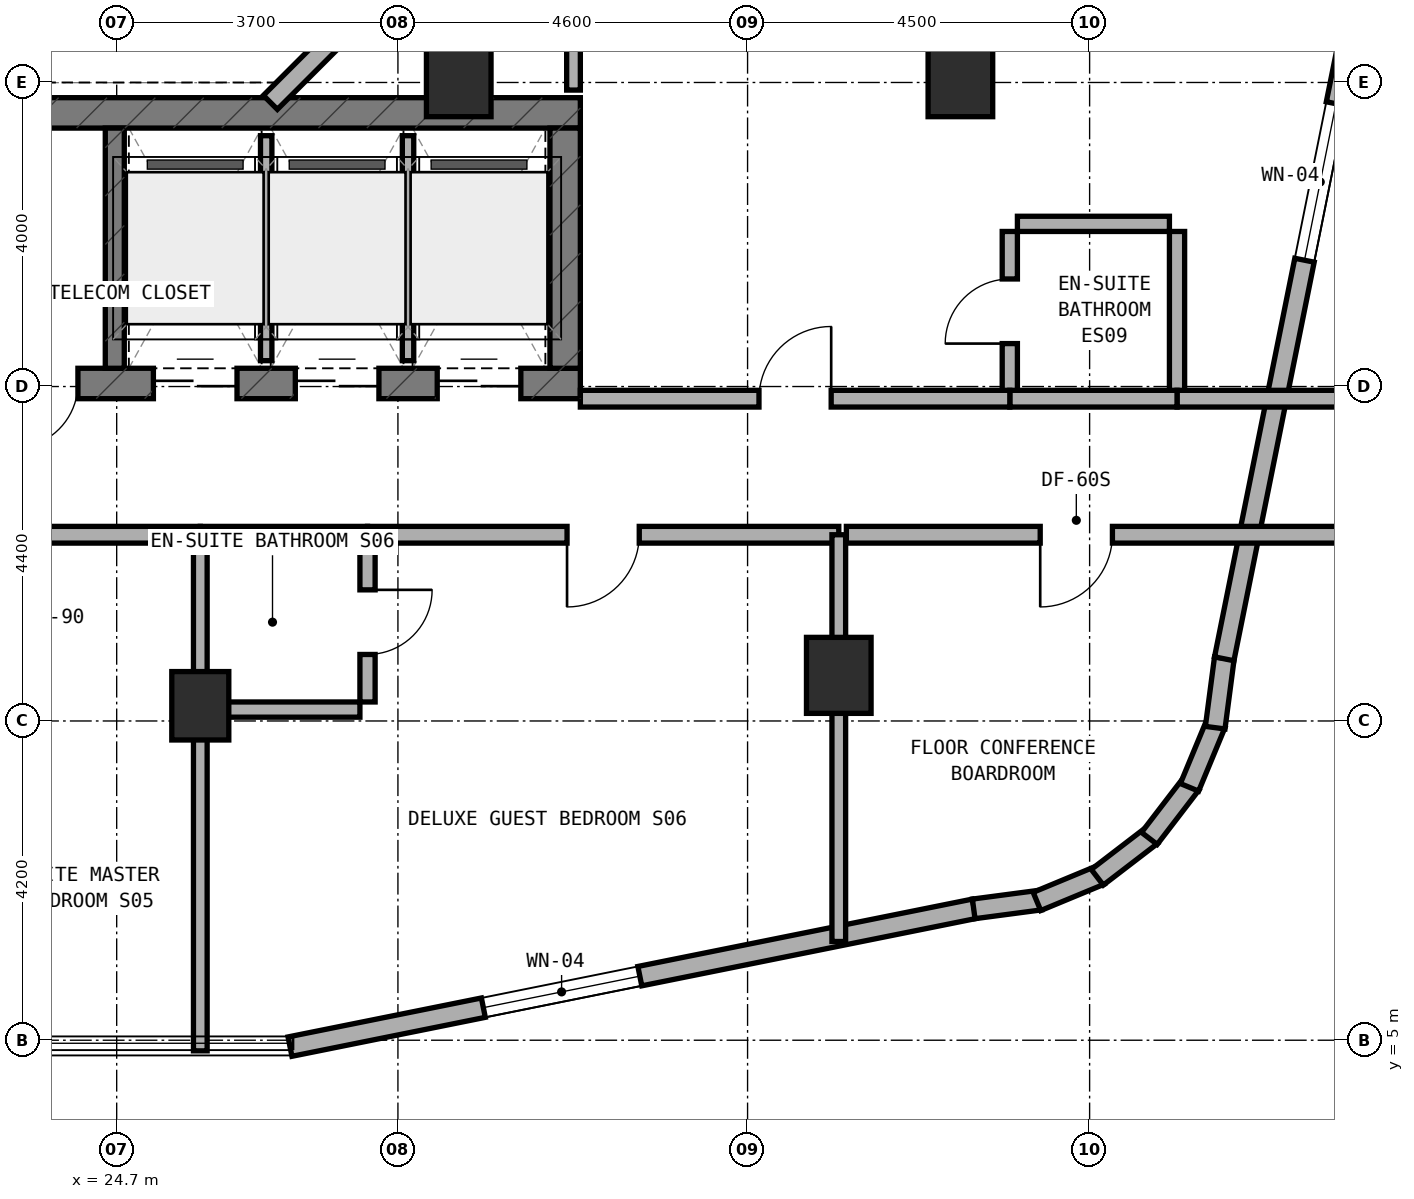
"""IFC4 building model, lengths in metres.
Left out: names, types, materials, properties, quantities, classifications, styles, units other than length and angle.
Written with IfcOpenShell. Run it as: python <this file> out.ifc"""

import sys

from ifc_helpers import new_model, si_unit, direction, frame, frame_2d, origin, origin_2d, place, context, subcontext, project, spatial, rectangle, extrude, element, fill, save


model = new_model("IFC4")
c1 = context("Model", 3, precision=1e-05, world=origin(), true_north=direction((0.0, 1.0)))
c2 = subcontext(c1, "Body", "Model", "MODEL_VIEW")
j1 = project(units=[si_unit("LENGTHUNIT", "METRE"), si_unit("PLANEANGLEUNIT", "RADIAN")], contexts=[c1])
p1 = place(None, origin())
s1 = spatial("IfcSite", under=j1, at=p1, CompositionType="ELEMENT")
p2 = place(p1, origin())
s2 = spatial("IfcBuilding", under=s1, at=p2, CompositionType="ELEMENT")
p3 = place(p2, frame((0.0, 0.0, 138.0)))
s3 = spatial("IfcBuildingStorey", under=s2, at=p3, CompositionType="ELEMENT", Elevation=138.0)
p4 = place(p3, frame((6.4, 13.64, 0.0), z_axis=(0.0, 0.0, 1.0), x_axis=(1.0, 0.0, 0.0)))
e1 = element("IfcWall", 1, at=p4, inside=s3, PredefinedType="SHEAR", context=c2, shape_type="SweptSolid", body=[
    extrude(rectangle(XDim=24.4, YDim=0.4, at=frame_2d((12.2, 0.0))), origin(), (0.0, 0.0, 1.0), 3.5),
])
p5 = place(p4, frame((9.15, 0.0, 0.0)))
e2 = element("IfcOpeningElement", 2, at=p5, cuts=e1, PredefinedType="OPENING", context=c2, shape_type="SweptSolid", body=[
    extrude(rectangle(XDim=1.2, YDim=2.15, at=frame_2d((0.6, 1.075))), frame((0.0, 0.21, 0.0), z_axis=(0.0, -1.0, 0.0), x_axis=(1.0, 0.0, 0.0)), (0.0, 0.0, 1.0), 0.42),
])
p6 = place(p4, frame((16.94, 0.0, 0.0)))
e3 = element("IfcOpeningElement", 3, at=p6, cuts=e1, PredefinedType="OPENING", context=c2, shape_type="SweptSolid", body=[
    extrude(rectangle(XDim=0.85, YDim=2.1, at=frame_2d((0.425, 1.05))), frame((0.0, 0.21, 0.0), z_axis=(0.0, -1.0, 0.0), x_axis=(1.0, 0.0, 0.0)), (0.0, 0.0, 1.0), 0.42),
])
p7 = place(p4, frame((18.783, 0.0, 0.0)))
e4 = element("IfcOpeningElement", 4, at=p7, cuts=e1, PredefinedType="OPENING", context=c2, shape_type="SweptSolid", body=[
    extrude(rectangle(XDim=1.1, YDim=2.15, at=frame_2d((0.55, 1.075))), frame((0.0, 0.21, 0.0), z_axis=(0.0, -1.0, 0.0), x_axis=(1.0, 0.0, 0.0)), (0.0, 0.0, 1.0), 0.42),
])
p8 = place(p4, frame((20.65, 0.0, 0.0)))
e5 = element("IfcOpeningElement", 5, at=p8, cuts=e1, PredefinedType="OPENING", context=c2, shape_type="SweptSolid", body=[
    extrude(rectangle(XDim=1.1, YDim=2.15, at=frame_2d((0.55, 1.075))), frame((0.0, 0.21, 0.0), z_axis=(0.0, -1.0, 0.0), x_axis=(1.0, 0.0, 0.0)), (0.0, 0.0, 1.0), 0.42),
])
p9 = place(p4, frame((22.517, 0.0, 0.0)))
e6 = element("IfcOpeningElement", 6, at=p9, cuts=e1, PredefinedType="OPENING", context=c2, shape_type="SweptSolid", body=[
    extrude(rectangle(XDim=1.1, YDim=2.15, at=frame_2d((0.55, 1.075))), frame((0.0, 0.21, 0.0), z_axis=(0.0, -1.0, 0.0), x_axis=(1.0, 0.0, 0.0)), (0.0, 0.0, 1.0), 0.42),
])
p10 = place(p3, frame((6.4, 17.2, 0.0), z_axis=(0.0, 0.0, 1.0), x_axis=(1.0, 0.0, 0.0)))
e7 = element("IfcWall", 7, at=p10, inside=s3, PredefinedType="SHEAR", context=c2, shape_type="SweptSolid", body=[
    extrude(rectangle(XDim=24.4, YDim=0.4, at=frame_2d((12.2, 0.0))), origin(), (0.0, 0.0, 1.0), 3.5),
])
p11 = place(p3, frame((30.6, 13.84, 0.0), z_axis=(0.0, 0.0, 1.0), x_axis=(0.0, 1.0, 0.0)))
e8 = element("IfcWall", 8, at=p11, inside=s3, PredefinedType="SHEAR", context=c2, shape_type="SweptSolid", body=[
    extrude(rectangle(XDim=3.16, YDim=0.4, at=frame_2d((1.58, 0.0))), origin(), (0.0, 0.0, 1.0), 3.5),
])
p12 = place(p3, frame((24.675, 13.84, 0.0), z_axis=(0.0, 0.0, 1.0), x_axis=(0.0, 1.0, 0.0)))
e9 = element("IfcWall", 9, at=p12, inside=s3, PredefinedType="STANDARD", context=c2, shape_type="SweptSolid", body=[
    extrude(rectangle(XDim=3.16, YDim=0.25, at=frame_2d((1.58, 0.0))), origin(), (0.0, 0.0, 1.0), 3.22),
])
p13 = place(p3, frame((25.8, 9.4, 0.0), z_axis=(0.0, 0.0, 1.0), x_axis=(1.0, 0.0, 0.0)))
e10 = element("IfcColumn", 10, at=p13, inside=s3, PredefinedType="COLUMN", context=c2, shape_type="SweptSolid", body=[
    extrude(rectangle(XDim=0.75, YDim=0.9, at=origin_2d()), origin(), (0.0, 0.0, 1.0), 3.5),
])
for number, where, z_axis, x_axis in (
    (11, (34.2, 9.8, 0.0), (0.0, 0.0, 1.0), (1.0, 0.0, 0.0)),
    (12, (35.8, 17.65, 0.0), (0.0, 0.0, 1.0), (1.0, 0.0, 0.0)),
    (13, (29.2, 17.65, 0.0), (0.0, 0.0, 1.0), (1.0, 0.0, 0.0)),
):
    element("IfcColumn", number, at=place(p3, frame(where, z_axis=z_axis, x_axis=x_axis)), inside=s3, PredefinedType="COLUMN", context=c2, shape_type="SweptSolid", body=[
        extrude(rectangle(XDim=0.85, YDim=1.0, at=origin_2d()), origin(), (0.0, 0.0, 1.0), 3.5),
    ])
p14 = place(p3, frame((26.98, 4.916, 0.0), z_axis=(0.0, 0.0, 1.0), x_axis=(0.980315963543, 0.197435082048, 0.0)))
e14 = element("IfcWall", 14, at=p14, inside=s3, PredefinedType="STANDARD", context=c2, shape_type="SweptSolid", body=[
    extrude(rectangle(XDim=9.183, YDim=0.26, at=frame_2d((4.591, 0.0))), origin(), (0.0, 0.0, 1.0), 3.22),
])
p15 = place(p14, frame((2.595, 0.0, 0.85)))
e15 = element("IfcOpeningElement", 15, at=p15, cuts=e14, PredefinedType="OPENING", context=c2, shape_type="SweptSolid", body=[
    extrude(rectangle(XDim=2.1, YDim=1.5, at=frame_2d((1.05, 0.75))), frame((0.0, 0.14, 0.0), z_axis=(0.0, -1.0, 0.0), x_axis=(1.0, 0.0, 0.0)), (0.0, 0.0, 1.0), 0.28),
])
p16 = place(p3, frame((35.975, 6.728, 0.0), z_axis=(0.0, 0.0, 1.0), x_axis=(0.991388484223, 0.130953706898, 0.0)))
e16 = element("IfcWall", 16, at=p16, inside=s3, PredefinedType="STANDARD", context=c2, shape_type="SweptSolid", body=[
    extrude(rectangle(XDim=0.885, YDim=0.26, at=frame_2d((0.443, 0.0))), origin(), (0.0, 0.0, 1.0), 3.22),
])
p17 = place(p3, frame((36.807, 6.826, 0.0), z_axis=(0.0, 0.0, 1.0), x_axis=(0.923627776508, 0.383290660547, 0.0)))
e17 = element("IfcWall", 17, at=p17, inside=s3, PredefinedType="STANDARD", context=c2, shape_type="SweptSolid", body=[
    extrude(rectangle(XDim=0.903, YDim=0.26, at=frame_2d((0.452, 0.0))), origin(), (0.0, 0.0, 1.0), 3.22),
])
p18 = place(p3, frame((37.601, 7.144, 0.0), z_axis=(0.0, 0.0, 1.0), x_axis=(0.793458244748, 0.608624690463, 0.0)))
e18 = element("IfcWall", 18, at=p18, inside=s3, PredefinedType="STANDARD", context=c2, shape_type="SweptSolid", body=[
    extrude(rectangle(XDim=0.902, YDim=0.26, at=frame_2d((0.451, 0.0))), origin(), (0.0, 0.0, 1.0), 3.22),
])
p19 = place(p3, frame((38.286, 7.655, 0.0), z_axis=(0.0, 0.0, 1.0), x_axis=(0.608494022858, 0.793558456666, 0.0)))
e19 = element("IfcWall", 19, at=p19, inside=s3, PredefinedType="STANDARD", context=c2, shape_type="SweptSolid", body=[
    extrude(rectangle(XDim=0.902, YDim=0.26, at=frame_2d((0.451, 0.0))), origin(), (0.0, 0.0, 1.0), 3.22),
])
p20 = place(p3, frame((38.814, 8.327, 0.0), z_axis=(0.0, 0.0, 1.0), x_axis=(0.383155708213, 0.923683767999, 0.0)))
e20 = element("IfcWall", 20, at=p20, inside=s3, PredefinedType="STANDARD", context=c2, shape_type="SweptSolid", body=[
    extrude(rectangle(XDim=0.903, YDim=0.26, at=frame_2d((0.451, 0.0))), origin(), (0.0, 0.0, 1.0), 3.22),
])
p21 = place(p3, frame((39.152, 9.112, 0.0), z_axis=(0.0, 0.0, 1.0), x_axis=(0.130200706103, 0.991487658083, 0.0)))
e21 = element("IfcWall", 21, at=p21, inside=s3, PredefinedType="STANDARD", context=c2, shape_type="SweptSolid", body=[
    extrude(rectangle(XDim=0.921, YDim=0.26, at=frame_2d((0.46, 0.0))), origin(), (0.0, 0.0, 1.0), 3.22),
])
p22 = place(p3, frame((39.271, 10.018, 0.0), z_axis=(0.0, 0.0, 1.0), x_axis=(0.197435082048, 0.980315963543, 0.0)))
e22 = element("IfcWall", 22, at=p22, inside=s3, PredefinedType="STANDARD", context=c2, shape_type="SweptSolid", body=[
    extrude(rectangle(XDim=9.183, YDim=0.26, at=frame_2d((4.591, 0.0))), origin(), (0.0, 0.0, 1.0), 3.22),
])
p23 = place(p22, frame((5.349, 0.0, 0.85)))
e23 = element("IfcOpeningElement", 23, at=p23, cuts=e22, PredefinedType="OPENING", context=c2, shape_type="SweptSolid", body=[
    extrude(rectangle(XDim=2.1, YDim=1.5, at=frame_2d((1.05, 0.75))), frame((0.0, 0.14, 0.0), z_axis=(0.0, -1.0, 0.0), x_axis=(1.0, 0.0, 0.0)), (0.0, 0.0, 1.0), 0.28),
])
p24 = place(p3, frame((26.722, 17.338, 0.0), z_axis=(0.0, 0.0, 1.0), x_axis=(0.707059717605, 0.707153841636, 0.0)))
e24 = element("IfcWall", 24, at=p24, inside=s3, PredefinedType="STANDARD", context=c2, shape_type="SweptSolid", body=[
    extrude(rectangle(XDim=2.594, YDim=0.26, at=frame_2d((1.297, 0.0))), origin(), (0.0, 0.0, 1.0), 3.22),
])
p25 = place(p3, frame((26.667, 13.94, 0.0), z_axis=(0.0, 0.0, 1.0), x_axis=(0.0, 1.0, 0.0)))
e25 = element("IfcWall", 25, at=p25, inside=s3, PredefinedType="PARTITIONING", context=c2, shape_type="SweptSolid", body=[
    extrude(rectangle(XDim=2.96, YDim=0.15, at=frame_2d((1.48, 0.0))), origin(), (0.0, 0.0, 1.0), 3.22),
])
p26 = place(p3, frame((28.533, 13.94, 0.0), z_axis=(0.0, 0.0, 1.0), x_axis=(0.0, 1.0, 0.0)))
e26 = element("IfcWall", 26, at=p26, inside=s3, PredefinedType="PARTITIONING", context=c2, shape_type="SweptSolid", body=[
    extrude(rectangle(XDim=2.96, YDim=0.15, at=frame_2d((1.48, 0.0))), origin(), (0.0, 0.0, 1.0), 2.695),
])
p27 = place(p3, frame((10.0, 11.65, 0.0), z_axis=(0.0, 0.0, 1.0), x_axis=(1.0, 0.0, 0.0)))
e27 = element("IfcWall", 27, at=p27, inside=s3, PredefinedType="SOLIDWALL", context=c2, shape_type="SweptSolid", body=[
    extrude(rectangle(XDim=15.8, YDim=0.22, at=frame_2d((7.9, 0.0))), origin(), (0.0, 0.0, 1.0), 2.695),
])
p28 = place(p27, frame((7.425, 0.0, 0.0)))
e28 = element("IfcOpeningElement", 28, at=p28, cuts=e27, PredefinedType="OPENING", context=c2, shape_type="SweptSolid", body=[
    extrude(rectangle(XDim=0.95, YDim=2.1, at=frame_2d((0.475, 1.05))), frame((0.0, 0.12, 0.0), z_axis=(0.0, -1.0, 0.0), x_axis=(1.0, 0.0, 0.0)), (0.0, 0.0, 1.0), 0.24),
])
p29 = place(p3, frame((25.8, 4.86, 0.0), z_axis=(0.0, 0.0, 1.0), x_axis=(0.0, 1.0, 0.0)))
e29 = element("IfcWall", 29, at=p29, inside=s3, PredefinedType="SOLIDWALL", context=c2, shape_type="SweptSolid", body=[
    extrude(rectangle(XDim=6.79, YDim=0.18, at=frame_2d((3.395, 0.0))), origin(), (0.0, 0.0, 1.0), 2.695),
])
p30 = place(p3, frame((28.0, 9.45, 0.0), z_axis=(0.0, 0.0, 1.0), x_axis=(0.0, 1.0, 0.0)))
e30 = element("IfcWall", 30, at=p30, inside=s3, PredefinedType="PLUMBINGWALL", context=c2, shape_type="SweptSolid", body=[
    extrude(rectangle(XDim=2.1, YDim=0.2, at=frame_2d((1.05, 0.0))), origin(), (0.0, 0.0, 1.0), 2.835),
])
p31 = place(p30, frame((0.625, 0.0, 0.0)))
e31 = element("IfcOpeningElement", 31, at=p31, cuts=e30, PredefinedType="OPENING", context=c2, shape_type="SweptSolid", body=[
    extrude(rectangle(XDim=0.85, YDim=2.1, at=frame_2d((0.425, 1.05))), frame((0.0, 0.11, 0.0), z_axis=(0.0, -1.0, 0.0), x_axis=(1.0, 0.0, 0.0)), (0.0, 0.0, 1.0), 0.22),
])
p32 = place(p3, frame((25.9, 9.35, 0.0), z_axis=(0.0, 0.0, 1.0), x_axis=(1.0, 0.0, 0.0)))
e32 = element("IfcWall", 32, at=p32, inside=s3, PredefinedType="PLUMBINGWALL", context=c2, shape_type="SweptSolid", body=[
    extrude(rectangle(XDim=2.0, YDim=0.2, at=frame_2d((1.0, 0.0))), origin(), (0.0, 0.0, 1.0), 2.835),
])
p33 = place(p3, frame((25.8, 11.65, 0.0), z_axis=(0.0, 0.0, 1.0), x_axis=(1.0, 0.0, 0.0)))
e33 = element("IfcWall", 33, at=p33, inside=s3, PredefinedType="SOLIDWALL", context=c2, shape_type="SweptSolid", body=[
    extrude(rectangle(XDim=2.2, YDim=0.22, at=frame_2d((1.1, 0.0))), origin(), (0.0, 0.0, 1.0), 2.695),
])
p34 = place(p3, frame((28.0, 11.65, 0.0), z_axis=(0.0, 0.0, 1.0), x_axis=(1.0, 0.0, 0.0)))
e34 = element("IfcWall", 34, at=p34, inside=s3, PredefinedType="SOLIDWALL", context=c2, shape_type="SweptSolid", body=[
    extrude(rectangle(XDim=6.2, YDim=0.22, at=frame_2d((3.1, 0.0))), origin(), (0.0, 0.0, 1.0), 2.695),
])
p35 = place(p34, frame((2.625, 0.0, 0.0)))
e35 = element("IfcOpeningElement", 35, at=p35, cuts=e34, PredefinedType="OPENING", context=c2, shape_type="SweptSolid", body=[
    extrude(rectangle(XDim=0.95, YDim=2.1, at=frame_2d((0.475, 1.05))), frame((0.0, 0.12, 0.0), z_axis=(0.0, -1.0, 0.0), x_axis=(1.0, 0.0, 0.0)), (0.0, 0.0, 1.0), 0.24),
])
p36 = place(p3, frame((34.2, 6.299, 0.0), z_axis=(0.0, 0.0, 1.0), x_axis=(0.0, 1.0, 0.0)))
e36 = element("IfcWall", 36, at=p36, inside=s3, PredefinedType="SOLIDWALL", context=c2, shape_type="SweptSolid", body=[
    extrude(rectangle(XDim=5.351, YDim=0.18, at=frame_2d((2.675, 0.0))), origin(), (0.0, 0.0, 1.0), 2.695),
])
p37 = place(p3, frame((34.3, 11.65, 0.0), z_axis=(0.0, 0.0, 1.0), x_axis=(1.0, 0.0, 0.0)))
e37 = element("IfcWall", 37, at=p37, inside=s3, PredefinedType="SOLIDWALL", context=c2, shape_type="SweptSolid", body=[
    extrude(rectangle(XDim=6.64, YDim=0.22, at=frame_2d((3.32, 0.0))), origin(), (0.0, 0.0, 1.0), 2.835),
])
p38 = place(p37, frame((2.55, 0.0, 0.0)))
e38 = element("IfcOpeningElement", 38, at=p38, cuts=e37, PredefinedType="OPENING", context=c2, shape_type="SweptSolid", body=[
    extrude(rectangle(XDim=0.95, YDim=2.1, at=frame_2d((0.475, 1.05))), frame((0.0, 0.12, 0.0), z_axis=(0.0, -1.0, 0.0), x_axis=(1.0, 0.0, 0.0)), (0.0, 0.0, 1.0), 0.24),
])
p39 = place(p3, frame((30.71, 17.5, 0.0), z_axis=(0.0, 0.0, 1.0), x_axis=(0.0, 1.0, 0.0)))
e39 = element("IfcWall", 39, at=p39, inside=s3, PredefinedType="SOLIDWALL", context=c2, shape_type="SweptSolid", body=[
    extrude(rectangle(XDim=15.0, YDim=0.18, at=frame_2d((7.5, 0.0))), origin(), (0.0, 0.0, 1.0), 2.695),
])
p40 = place(p3, frame((36.45, 13.54, 0.0), z_axis=(0.0, 0.0, 1.0), x_axis=(0.0, 1.0, 0.0)))
e40 = element("IfcWall", 40, at=p40, inside=s3, PredefinedType="PLUMBINGWALL", context=c2, shape_type="SweptSolid", body=[
    extrude(rectangle(XDim=2.1, YDim=0.2, at=frame_2d((1.05, 0.0))), origin(), (0.0, 0.0, 1.0), 3.22),
])
p41 = place(p40, frame((0.625, 0.0, 0.0)))
e41 = element("IfcOpeningElement", 41, at=p41, cuts=e40, PredefinedType="OPENING", context=c2, shape_type="SweptSolid", body=[
    extrude(rectangle(XDim=0.85, YDim=2.1, at=frame_2d((0.425, 1.05))), frame((0.0, 0.11, 0.0), z_axis=(0.0, -1.0, 0.0), x_axis=(1.0, 0.0, 0.0)), (0.0, 0.0, 1.0), 0.22),
])
p42 = place(p3, frame((36.55, 15.74, 0.0), z_axis=(0.0, 0.0, 1.0), x_axis=(1.0, 0.0, 0.0)))
e42 = element("IfcWall", 42, at=p42, inside=s3, PredefinedType="PLUMBINGWALL", context=c2, shape_type="SweptSolid", body=[
    extrude(rectangle(XDim=2.0, YDim=0.2, at=frame_2d((1.0, 0.0))), origin(), (0.0, 0.0, 1.0), 3.22),
])
p43 = place(p3, frame((38.65, 13.54, 0.0), z_axis=(0.0, 0.0, 1.0), x_axis=(0.0, 1.0, 0.0)))
e43 = element("IfcWall", 43, at=p43, inside=s3, PredefinedType="PLUMBINGWALL", context=c2, shape_type="SweptSolid", body=[
    extrude(rectangle(XDim=2.1, YDim=0.2, at=frame_2d((1.05, 0.0))), origin(), (0.0, 0.0, 1.0), 3.22),
])
p44 = place(p3, frame((38.65, 13.44, 0.0), z_axis=(0.0, 0.0, 1.0), x_axis=(1.0, 0.0, 0.0)))
e44 = element("IfcWall", 44, at=p44, inside=s3, PredefinedType="SOLIDWALL", context=c2, shape_type="SweptSolid", body=[
    extrude(rectangle(XDim=2.55, YDim=0.22, at=frame_2d((1.275, 0.0))), origin(), (0.0, 0.0, 1.0), 3.22),
])
p45 = place(p3, frame((36.45, 13.44, 0.0), z_axis=(0.0, 0.0, 1.0), x_axis=(1.0, 0.0, 0.0)))
e45 = element("IfcWall", 45, at=p45, inside=s3, PredefinedType="SOLIDWALL", context=c2, shape_type="SweptSolid", body=[
    extrude(rectangle(XDim=2.2, YDim=0.22, at=frame_2d((1.1, 0.0))), origin(), (0.0, 0.0, 1.0), 3.22),
])
p46 = place(p3, frame((30.8, 13.44, 0.0), z_axis=(0.0, 0.0, 1.0), x_axis=(1.0, 0.0, 0.0)))
e46 = element("IfcWall", 46, at=p46, inside=s3, PredefinedType="SOLIDWALL", context=c2, shape_type="SweptSolid", body=[
    extrude(rectangle(XDim=5.65, YDim=0.22, at=frame_2d((2.825, 0.0))), origin(), (0.0, 0.0, 1.0), 2.695),
])
p47 = place(p46, frame((2.35, 0.0, 0.0)))
e47 = element("IfcOpeningElement", 47, at=p47, cuts=e46, PredefinedType="OPENING", context=c2, shape_type="SweptSolid", body=[
    extrude(rectangle(XDim=0.95, YDim=2.1, at=frame_2d((0.475, 1.05))), frame((0.0, 0.12, 0.0), z_axis=(0.0, -1.0, 0.0), x_axis=(1.0, 0.0, 0.0)), (0.0, 0.0, 1.0), 0.24),
])
p48 = place(p15, origin())
e48 = element("IfcWindow", 48, at=p48, inside=s3, PartitioningType="SINGLE_PANEL", PredefinedType="WINDOW", context=c2, shape_type="SweptSolid", body=[
    extrude(rectangle(XDim=2.1, YDim=1.5, at=frame_2d((1.05, 0.75))), frame((0.0, 0.03, 0.0), z_axis=(0.0, -1.0, 0.0), x_axis=(1.0, 0.0, 0.0)), (0.0, 0.0, 1.0), 0.06),
])
fill(e15, e48)
p49 = place(p23, origin())
e49 = element("IfcWindow", 49, at=p49, inside=s3, PartitioningType="SINGLE_PANEL", PredefinedType="WINDOW", context=c2, shape_type="SweptSolid", body=[
    extrude(rectangle(XDim=2.1, YDim=1.5, at=frame_2d((1.05, 0.75))), frame((0.0, 0.03, 0.0), z_axis=(0.0, -1.0, 0.0), x_axis=(1.0, 0.0, 0.0)), (0.0, 0.0, 1.0), 0.06),
])
fill(e23, e49)
p50 = place(p6, frame((0.85, 0.0, 0.0), z_axis=(0.0, 0.0, 1.0), x_axis=(-1.0, 0.0, 0.0)))
e50 = element("IfcDoor", 50, at=p50, inside=s3, OperationType="SINGLE_SWING_RIGHT", PredefinedType="DOOR", context=c2, shape_type="SweptSolid", body=[
    extrude(rectangle(XDim=0.85, YDim=2.1, at=frame_2d((0.425, 1.05))), frame((0.0, 0.025, 0.0), z_axis=(0.0, -1.0, 0.0), x_axis=(1.0, 0.0, 0.0)), (0.0, 0.0, 1.0), 0.05),
])
fill(e3, e50)
p51 = place(p7, frame((1.1, 0.0, 0.0), z_axis=(0.0, 0.0, 1.0), x_axis=(-1.0, 0.0, 0.0)))
e51 = element("IfcDoor", 51, at=p51, inside=s3, OperationType="DOUBLE_DOOR_SLIDING", PredefinedType="DOOR", context=c2, shape_type="SweptSolid", body=[
    extrude(rectangle(XDim=1.1, YDim=2.15, at=frame_2d((0.55, 1.075))), frame((0.0, 0.025, 0.0), z_axis=(0.0, -1.0, 0.0), x_axis=(1.0, 0.0, 0.0)), (0.0, 0.0, 1.0), 0.05),
])
fill(e4, e51)
p52 = place(p8, frame((1.1, 0.0, 0.0), z_axis=(0.0, 0.0, 1.0), x_axis=(-1.0, 0.0, 0.0)))
e52 = element("IfcDoor", 52, at=p52, inside=s3, OperationType="DOUBLE_DOOR_SLIDING", PredefinedType="DOOR", context=c2, shape_type="SweptSolid", body=[
    extrude(rectangle(XDim=1.1, YDim=2.15, at=frame_2d((0.55, 1.075))), frame((0.0, 0.025, 0.0), z_axis=(0.0, -1.0, 0.0), x_axis=(1.0, 0.0, 0.0)), (0.0, 0.0, 1.0), 0.05),
])
fill(e5, e52)
p53 = place(p9, frame((1.1, 0.0, 0.0), z_axis=(0.0, 0.0, 1.0), x_axis=(-1.0, 0.0, 0.0)))
e53 = element("IfcDoor", 53, at=p53, inside=s3, OperationType="DOUBLE_DOOR_SLIDING", PredefinedType="DOOR", context=c2, shape_type="SweptSolid", body=[
    extrude(rectangle(XDim=1.1, YDim=2.15, at=frame_2d((0.55, 1.075))), frame((0.0, 0.025, 0.0), z_axis=(0.0, -1.0, 0.0), x_axis=(1.0, 0.0, 0.0)), (0.0, 0.0, 1.0), 0.05),
])
fill(e6, e53)
p54 = place(p31, frame((0.85, 0.0, 0.0), z_axis=(0.0, 0.0, 1.0), x_axis=(-1.0, 0.0, 0.0)))
e54 = element("IfcDoor", 54, at=p54, inside=s3, OperationType="SINGLE_SWING_LEFT", PredefinedType="DOOR", context=c2, shape_type="SweptSolid", body=[
    extrude(rectangle(XDim=0.85, YDim=2.1, at=frame_2d((0.425, 1.05))), frame((0.0, 0.025, 0.0), z_axis=(0.0, -1.0, 0.0), x_axis=(1.0, 0.0, 0.0)), (0.0, 0.0, 1.0), 0.05),
])
fill(e31, e54)
p55 = place(p35, frame((0.95, 0.0, 0.0), z_axis=(0.0, 0.0, 1.0), x_axis=(-1.0, 0.0, 0.0)))
e55 = element("IfcDoor", 55, at=p55, inside=s3, OperationType="SINGLE_SWING_RIGHT", PredefinedType="DOOR", context=c2, shape_type="SweptSolid", body=[
    extrude(rectangle(XDim=0.95, YDim=2.1, at=frame_2d((0.475, 1.05))), frame((0.0, 0.025, 0.0), z_axis=(0.0, -1.0, 0.0), x_axis=(1.0, 0.0, 0.0)), (0.0, 0.0, 1.0), 0.05),
])
fill(e35, e55)
p56 = place(p38, frame((0.95, 0.0, 0.0), z_axis=(0.0, 0.0, 1.0), x_axis=(-1.0, 0.0, 0.0)))
e56 = element("IfcDoor", 56, at=p56, inside=s3, OperationType="SINGLE_SWING_RIGHT", PredefinedType="DOOR", context=c2, shape_type="SweptSolid", body=[
    extrude(rectangle(XDim=0.95, YDim=2.1, at=frame_2d((0.475, 1.05))), frame((0.0, 0.025, 0.0), z_axis=(0.0, -1.0, 0.0), x_axis=(1.0, 0.0, 0.0)), (0.0, 0.0, 1.0), 0.05),
])
fill(e38, e56)
p57 = place(p41, origin())
e57 = element("IfcDoor", 57, at=p57, inside=s3, OperationType="SINGLE_SWING_LEFT", PredefinedType="DOOR", context=c2, shape_type="SweptSolid", body=[
    extrude(rectangle(XDim=0.85, YDim=2.1, at=frame_2d((0.425, 1.05))), frame((0.0, 0.025, 0.0), z_axis=(0.0, -1.0, 0.0), x_axis=(1.0, 0.0, 0.0)), (0.0, 0.0, 1.0), 0.05),
])
fill(e41, e57)
p58 = place(p47, origin())
e58 = element("IfcDoor", 58, at=p58, inside=s3, OperationType="SINGLE_SWING_RIGHT", PredefinedType="DOOR", context=c2, shape_type="SweptSolid", body=[
    extrude(rectangle(XDim=0.95, YDim=2.1, at=frame_2d((0.475, 1.05))), frame((0.0, 0.025, 0.0), z_axis=(0.0, -1.0, 0.0), x_axis=(1.0, 0.0, 0.0)), (0.0, 0.0, 1.0), 0.05),
])
fill(e47, e58)
save(model, sys.argv[1])
